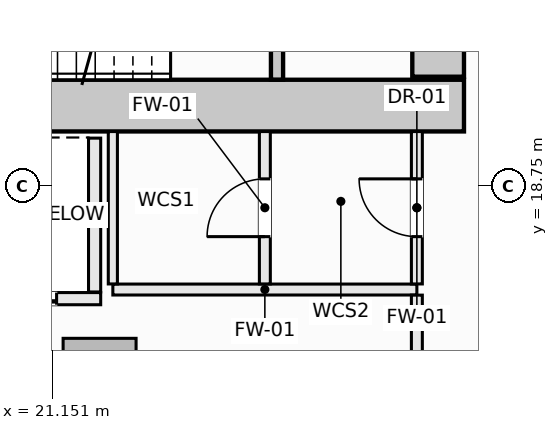
"""IFC4 building model, lengths in metres.
Left out: names, types, materials, properties, quantities, classifications, styles, units other than length and angle.
Written with IfcOpenShell. Run it as: python <this file> out.ifc"""

import sys

from ifc_helpers import new_model, si_unit, direction, frame, frame_2d, origin, origin_2d, place, context, subcontext, project, spatial, rectangle, extrude, element, fill, save


model = new_model("IFC4")
c1 = context("Model", 3, precision=1e-05, world=origin(), true_north=direction((0.0, 1.0)))
c2 = subcontext(c1, "Body", "Model", "MODEL_VIEW")
j1 = project(units=[si_unit("LENGTHUNIT", "METRE"), si_unit("PLANEANGLEUNIT", "RADIAN")], contexts=[c1])
p1 = place(None, origin())
s1 = spatial("IfcSite", under=j1, at=p1, CompositionType="ELEMENT")
p2 = place(p1, origin())
s2 = spatial("IfcBuilding", under=s1, at=p2, CompositionType="ELEMENT")
p3 = place(p2, frame((0.0, 0.0, 53.45)))
s3 = spatial("IfcBuildingStorey", under=s2, at=p3, CompositionType="ELEMENT", Elevation=53.45)
p4 = place(p3, frame((14.075, 20.075, -0.28), z_axis=(0.0, 0.0, 1.0), x_axis=(1.0, 0.0, 0.0)))
e1 = element("IfcWall", 1, at=p4, inside=s3, PredefinedType="SHEAR", context=c2, shape_type="SweptSolid", body=[
    extrude(rectangle(XDim=13.85, YDim=0.85, at=frame_2d((6.925, 0.0))), origin(), (0.0, 0.0, 1.0), 3.85),
])
p5 = place(p3, frame((27.5, 20.55, -0.28), z_axis=(0.0, 0.0, 1.0), x_axis=(0.0, 1.0, 0.0)))
e2 = element("IfcWall", 2, at=p5, inside=s3, PredefinedType="SHEAR", context=c2, shape_type="SweptSolid", body=[
    extrude(rectangle(XDim=1.5, YDim=0.85, at=frame_2d((0.75, 0.0))), origin(), (0.0, 0.0, 1.0), 3.85),
])
p6 = place(p3, frame((21.932, 15.648, -0.28), z_axis=(0.0, 0.0, 1.0), x_axis=(1.0, 0.0, 0.0)))
e3 = element("IfcColumn", 3, at=p6, inside=s3, PredefinedType="COLUMN", context=c2, shape_type="SweptSolid", body=[
    extrude(rectangle(XDim=1.2, YDim=1.2, at=origin_2d()), origin(), (0.0, 0.0, 1.0), 3.85),
])
p7 = place(p3, frame((24.85, 20.502, -0.28), z_axis=(0.0, 0.0, 1.0), x_axis=(0.0, 1.0, 0.0)))
e4 = element("IfcWall", 4, at=p7, inside=s3, PredefinedType="SHEAR", context=c2, shape_type="SweptSolid", body=[
    extrude(rectangle(XDim=3.038, YDim=0.2, at=frame_2d((1.519, 0.0))), origin(), (0.0, 0.0, 1.0), 3.85),
])
p8 = place(p7, frame((0.969, 0.0, 0.28)))
e5 = element("IfcOpeningElement", 5, at=p8, cuts=e4, PredefinedType="OPENING", context=c2, shape_type="SweptSolid", body=[
    extrude(rectangle(XDim=1.1, YDim=2.15, at=frame_2d((0.55, 1.075))), frame((0.0, 0.11, 0.0), z_axis=(0.0, -1.0, 0.0), x_axis=(1.0, 0.0, 0.0)), (0.0, 0.0, 1.0), 0.22),
])
p9 = place(p3, frame((19.4, 16.9, 0.0), z_axis=(0.0, 0.0, 1.0), x_axis=(1.0, 0.0, 0.0)))
e6 = element("IfcWall", 6, at=p9, inside=s3, PredefinedType="SOLIDWALL", context=c2, shape_type="SweptSolid", body=[
    extrude(rectangle(XDim=2.55, YDim=0.2, at=frame_2d((1.275, 0.0))), origin(), (0.0, 0.0, 1.0), 3.57),
])
p10 = place(p9, frame((0.725, 0.0, 0.0)))
e7 = element("IfcOpeningElement", 7, at=p10, cuts=e6, PredefinedType="OPENING", context=c2, shape_type="SweptSolid", body=[
    extrude(rectangle(XDim=1.1, YDim=2.2, at=frame_2d((0.55, 1.1))), frame((0.0, 0.11, 0.0), z_axis=(0.0, -1.0, 0.0), x_axis=(1.0, 0.0, 0.0)), (0.0, 0.0, 1.0), 0.22),
])
p11 = place(p3, frame((21.85, 17.01, 0.0), z_axis=(0.0, 0.0, 1.0), x_axis=(0.0, 1.0, 0.0)))
e8 = element("IfcWall", 8, at=p11, inside=s3, PredefinedType="SOLIDWALL", context=c2, shape_type="SweptSolid", body=[
    extrude(rectangle(XDim=2.53, YDim=0.2, at=frame_2d((1.265, 0.0))), origin(), (0.0, 0.0, 1.0), 3.57),
])
p12 = place(p3, frame((22.15, 17.05, 0.0), z_axis=(0.0, 0.0, 1.0), x_axis=(1.0, 0.0, 0.0)))
e9 = element("IfcWall", 9, at=p12, inside=s3, PredefinedType="SOLIDWALL", context=c2, shape_type="SweptSolid", body=[
    extrude(rectangle(XDim=5.0, YDim=0.18, at=frame_2d((2.5, 0.0))), origin(), (0.0, 0.0, 1.0), 3.57),
])
p13 = place(p3, frame((22.15, 17.142, 0.0), z_axis=(0.0, 0.0, 1.0), x_axis=(0.0, 1.0, 0.0)))
e10 = element("IfcWall", 10, at=p13, inside=s3, PredefinedType="PARTITIONING", context=c2, shape_type="SweptSolid", body=[
    extrude(rectangle(XDim=2.506, YDim=0.15, at=frame_2d((1.253, 0.0))), origin(), (0.0, 0.0, 1.0), 3.57),
])
p14 = place(p3, frame((24.65, 17.142, 0.0), z_axis=(0.0, 0.0, 1.0), x_axis=(0.0, 1.0, 0.0)))
e11 = element("IfcWall", 11, at=p14, inside=s3, PredefinedType="SOLIDWALL", context=c2, shape_type="SweptSolid", body=[
    extrude(rectangle(XDim=2.506, YDim=0.18, at=frame_2d((1.253, 0.0))), origin(), (0.0, 0.0, 1.0), 3.57),
])
p15 = place(p14, frame((0.778, 0.0, 0.0)))
e12 = element("IfcOpeningElement", 12, at=p15, cuts=e11, PredefinedType="OPENING", context=c2, shape_type="SweptSolid", body=[
    extrude(rectangle(XDim=0.95, YDim=2.1, at=frame_2d((0.475, 1.05))), frame((0.0, 0.1, 0.0), z_axis=(0.0, -1.0, 0.0), x_axis=(1.0, 0.0, 0.0)), (0.0, 0.0, 1.0), 0.2),
])
p16 = place(p3, frame((27.15, 11.75, 0.0), z_axis=(0.0, 0.0, 1.0), x_axis=(0.0, 1.0, 0.0)))
e13 = element("IfcWall", 13, at=p16, inside=s3, PredefinedType="SOLIDWALL", context=c2, shape_type="SweptSolid", body=[
    extrude(rectangle(XDim=5.208, YDim=0.18, at=frame_2d((2.604, 0.0))), origin(), (0.0, 0.0, 1.0), 3.57),
])
p17 = place(p16, frame((2.668, 0.0, 0.0)))
e14 = element("IfcOpeningElement", 14, at=p17, cuts=e13, PredefinedType="OPENING", context=c2, shape_type="SweptSolid", body=[
    extrude(rectangle(XDim=0.95, YDim=2.1, at=frame_2d((0.475, 1.05))), frame((0.0, 0.1, 0.0), z_axis=(0.0, -1.0, 0.0), x_axis=(1.0, 0.0, 0.0)), (0.0, 0.0, 1.0), 0.2),
])
p18 = place(p3, frame((27.15, 17.142, 0.0), z_axis=(0.0, 0.0, 1.0), x_axis=(0.0, 1.0, 0.0)))
e15 = element("IfcWall", 15, at=p18, inside=s3, PredefinedType="SOLIDWALL", context=c2, shape_type="SweptSolid", body=[
    extrude(rectangle(XDim=2.506, YDim=0.18, at=frame_2d((1.253, 0.0))), origin(), (0.0, 0.0, 1.0), 3.57),
])
p19 = place(p18, frame((0.778, 0.0, 0.0)))
e16 = element("IfcOpeningElement", 16, at=p19, cuts=e15, PredefinedType="OPENING", context=c2, shape_type="SweptSolid", body=[
    extrude(rectangle(XDim=0.95, YDim=2.1, at=frame_2d((0.475, 1.05))), frame((0.0, 0.1, 0.0), z_axis=(0.0, -1.0, 0.0), x_axis=(1.0, 0.0, 0.0)), (0.0, 0.0, 1.0), 0.2),
])
p20 = place(p10, origin())
e17 = element("IfcDoor", 17, at=p20, inside=s3, OperationType="SLIDING_TO_LEFT", PredefinedType="DOOR", context=c2, shape_type="SweptSolid", body=[
    extrude(rectangle(XDim=1.1, YDim=2.2, at=frame_2d((0.55, 1.1))), frame((0.0, 0.025, 0.0), z_axis=(0.0, -1.0, 0.0), x_axis=(1.0, 0.0, 0.0)), (0.0, 0.0, 1.0), 0.05),
])
fill(e7, e17)
p21 = place(p19, origin())
e18 = element("IfcDoor", 18, at=p21, inside=s3, OperationType="SINGLE_SWING_RIGHT", PredefinedType="DOOR", context=c2, shape_type="SweptSolid", body=[
    extrude(rectangle(XDim=0.95, YDim=2.1, at=frame_2d((0.475, 1.05))), frame((0.0, 0.025, 0.0), z_axis=(0.0, -1.0, 0.0), x_axis=(1.0, 0.0, 0.0)), (0.0, 0.0, 1.0), 0.05),
])
fill(e16, e18)
p22 = place(p15, origin())
e19 = element("IfcDoor", 19, at=p22, inside=s3, OperationType="SINGLE_SWING_LEFT", PredefinedType="DOOR", context=c2, shape_type="SweptSolid", body=[
    extrude(rectangle(XDim=0.95, YDim=2.1, at=frame_2d((0.475, 1.05))), frame((0.0, 0.025, 0.0), z_axis=(0.0, -1.0, 0.0), x_axis=(1.0, 0.0, 0.0)), (0.0, 0.0, 1.0), 0.05),
])
fill(e12, e19)
save(model, sys.argv[1])
